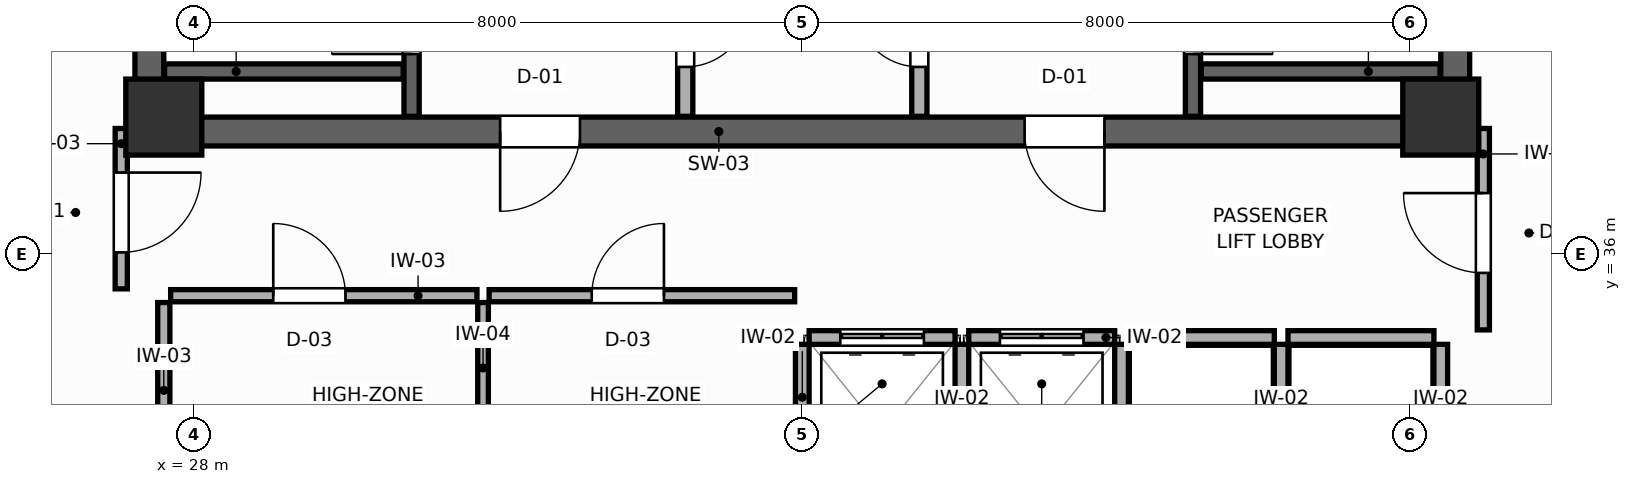
"""IFC4 building model, lengths in metres.
Left out: names, types, materials, properties, quantities, classifications, styles, units other than length and angle.
Written with IfcOpenShell. Run it as: python <this file> out.ifc"""

import sys

from ifc_helpers import new_model, si_unit, direction, frame, frame_2d, origin, origin_2d, place, context, subcontext, project, spatial, rectangle, extrude, source, transform, mapped, element, fill, save


model = new_model("IFC4")
c1 = context("Model", 3, precision=1e-05, world=origin(), true_north=direction((0.0, 1.0)))
c2 = subcontext(c1, "Body", "Model", "MODEL_VIEW")
j1 = project(units=[si_unit("LENGTHUNIT", "METRE"), si_unit("PLANEANGLEUNIT", "RADIAN")], contexts=[c1])
p1 = place(None, origin())
s1 = spatial("IfcSite", under=j1, at=p1, CompositionType="ELEMENT")
p2 = place(p1, origin())
s2 = spatial("IfcBuilding", under=s1, at=p2, CompositionType="ELEMENT")
p3 = place(p2, frame((0.0, 0.0, 216.6)))
s3 = spatial("IfcBuildingStorey", under=s2, at=p3, CompositionType="ELEMENT", Elevation=216.6)
p4 = place(p3, frame((27.22, 37.61, 0.0), z_axis=(0.0, 0.0, 1.0), x_axis=(1.0, 0.0, 0.0)))
e1 = element("IfcWall", 1, at=p4, inside=s3, PredefinedType="SHEAR", context=c2, shape_type="SweptSolid", body=[
    extrude(rectangle(XDim=17.56, YDim=0.38, at=frame_2d((8.78, 0.0))), origin(), (0.0, 0.0, 1.0), 3.6),
])
p5 = place(p4, frame((4.805, 0.0, 0.0)))
e2 = element("IfcOpeningElement", 2, at=p5, cuts=e1, PredefinedType="OPENING", context=c2, shape_type="SweptSolid", body=[
    extrude(rectangle(XDim=1.05, YDim=2.1, at=frame_2d((0.525, 1.05))), frame((0.0, 0.2, 0.0), z_axis=(0.0, -1.0, 0.0), x_axis=(1.0, 0.0, 0.0)), (0.0, 0.0, 1.0), 0.4),
])
p6 = place(p4, frame((11.705, 0.0, 0.0)))
e3 = element("IfcOpeningElement", 3, at=p6, cuts=e1, PredefinedType="OPENING", context=c2, shape_type="SweptSolid", body=[
    extrude(rectangle(XDim=1.05, YDim=2.1, at=frame_2d((0.525, 1.05))), frame((0.0, 0.2, 0.0), z_axis=(0.0, -1.0, 0.0), x_axis=(1.0, 0.0, 0.0)), (0.0, 0.0, 1.0), 0.4),
])
for number, where, z_axis, x_axis in (
    (4, (27.41, 37.8, 0.0), (0.0, 0.0, 1.0), (0.0, 1.0, 0.0)),
    (5, (44.59, 37.8, 0.0), (0.0, 0.0, 1.0), (0.0, 1.0, 0.0)),
):
    element("IfcWall", number, at=place(p3, frame(where, z_axis=z_axis, x_axis=x_axis)), inside=s3, PredefinedType="SHEAR", context=c2, shape_type="SweptSolid", body=[
        extrude(rectangle(XDim=9.0, YDim=0.38, at=frame_2d((4.5, 0.0))), origin(), (0.0, 0.0, 1.0), 3.6),
    ])
m1 = source(origin(), c2, "Body", "SweptSolid", [
    extrude(rectangle(XDim=1.0, YDim=1.0, at=origin_2d()), origin(), (0.0, 0.0, 1.0), 3.6),
])
for number, where, z_axis, x_axis in (
    (6, (27.6, 37.8, 0.0), (0.0, 0.0, 1.0), (1.0, 0.0, 0.0)),
    (7, (44.4, 37.8, 0.0), (0.0, 0.0, 1.0), (1.0, 0.0, 0.0)),
):
    element("IfcColumn", number, at=place(p3, frame(where, z_axis=z_axis, x_axis=x_axis)), inside=s3, PredefinedType="COLUMN", context=c2, shape_type="MappedRepresentation", body=[
        mapped(m1, transform((0.0, 0.0, 0.0), scale=1.0)),
    ])
p7 = place(p3, frame((30.86, 37.81, 0.0), z_axis=(0.0, 0.0, 1.0), x_axis=(0.0, 1.0, 0.0)))
e8 = element("IfcWall", 8, at=p7, inside=s3, PredefinedType="SHEAR", context=c2, shape_type="SweptSolid", body=[
    extrude(rectangle(XDim=8.98, YDim=0.2, at=frame_2d((4.49, 0.0))), origin(), (0.0, 0.0, 1.0), 3.6),
])
p8 = place(p7, frame((0.82, 0.0, 0.0)))
e9 = element("IfcOpeningElement", 9, at=p8, cuts=e8, PredefinedType="OPENING", context=c2, shape_type="SweptSolid", body=[
    extrude(rectangle(XDim=1.05, YDim=2.1, at=frame_2d((0.525, 1.05))), frame((0.0, 0.11, 0.0), z_axis=(0.0, -1.0, 0.0), x_axis=(1.0, 0.0, 0.0)), (0.0, 0.0, 1.0), 0.22),
])
p9 = place(p3, frame((27.61, 38.4, 0.0), z_axis=(0.0, 0.0, 1.0), x_axis=(1.0, 0.0, 0.0)))
e10 = element("IfcWall", 10, at=p9, inside=s3, PredefinedType="SHEAR", context=c2, shape_type="SweptSolid", body=[
    extrude(rectangle(XDim=3.14, YDim=0.2, at=frame_2d((1.57, 0.0))), origin(), (0.0, 0.0, 1.0), 3.6),
])
p10 = place(p3, frame((41.14, 37.81, 0.0), z_axis=(0.0, 0.0, 1.0), x_axis=(0.0, 1.0, 0.0)))
e11 = element("IfcWall", 11, at=p10, inside=s3, PredefinedType="SHEAR", context=c2, shape_type="SweptSolid", body=[
    extrude(rectangle(XDim=8.98, YDim=0.2, at=frame_2d((4.49, 0.0))), origin(), (0.0, 0.0, 1.0), 3.6),
])
p11 = place(p10, frame((0.82, 0.0, 0.0)))
e12 = element("IfcOpeningElement", 12, at=p11, cuts=e11, PredefinedType="OPENING", context=c2, shape_type="SweptSolid", body=[
    extrude(rectangle(XDim=1.05, YDim=2.1, at=frame_2d((0.525, 1.05))), frame((0.0, 0.11, 0.0), z_axis=(0.0, -1.0, 0.0), x_axis=(1.0, 0.0, 0.0)), (0.0, 0.0, 1.0), 0.22),
])
p12 = place(p3, frame((41.25, 38.4, 0.0), z_axis=(0.0, 0.0, 1.0), x_axis=(1.0, 0.0, 0.0)))
e13 = element("IfcWall", 13, at=p12, inside=s3, PredefinedType="SHEAR", context=c2, shape_type="SweptSolid", body=[
    extrude(rectangle(XDim=3.14, YDim=0.2, at=frame_2d((1.57, 0.0))), origin(), (0.0, 0.0, 1.0), 3.6),
])
p13 = place(p3, frame((34.46, 37.81, 0.0), z_axis=(0.0, 0.0, 1.0), x_axis=(0.0, 1.0, 0.0)))
e14 = element("IfcWall", 14, at=p13, inside=s3, PredefinedType="PARTITIONING", context=c2, shape_type="SweptSolid", body=[
    extrude(rectangle(XDim=8.98, YDim=0.2, at=frame_2d((4.49, 0.0))), origin(), (0.0, 0.0, 1.0), 3.41),
])
p14 = place(p13, frame((0.65, 0.0, 0.0)))
e15 = element("IfcOpeningElement", 15, at=p14, cuts=e14, PredefinedType="OPENING", context=c2, shape_type="SweptSolid", body=[
    extrude(rectangle(XDim=0.85, YDim=2.05, at=frame_2d((0.425, 1.025))), frame((0.0, 0.11, 0.0), z_axis=(0.0, -1.0, 0.0), x_axis=(1.0, 0.0, 0.0)), (0.0, 0.0, 1.0), 0.22),
])
p15 = place(p3, frame((37.54, 37.81, 0.0), z_axis=(0.0, 0.0, 1.0), x_axis=(0.0, 1.0, 0.0)))
e16 = element("IfcWall", 16, at=p15, inside=s3, PredefinedType="PARTITIONING", context=c2, shape_type="SweptSolid", body=[
    extrude(rectangle(XDim=8.98, YDim=0.2, at=frame_2d((4.49, 0.0))), origin(), (0.0, 0.0, 1.0), 3.41),
])
p16 = place(p15, frame((0.65, 0.0, 0.0)))
e17 = element("IfcOpeningElement", 17, at=p16, cuts=e16, PredefinedType="OPENING", context=c2, shape_type="SweptSolid", body=[
    extrude(rectangle(XDim=0.85, YDim=2.05, at=frame_2d((0.425, 1.025))), frame((0.0, 0.11, 0.0), z_axis=(0.0, -1.0, 0.0), x_axis=(1.0, 0.0, 0.0)), (0.0, 0.0, 1.0), 0.22),
])
p17 = place(p3, frame((36.09, 34.9, 0.0), z_axis=(0.0, 0.0, 1.0), x_axis=(1.0, 0.0, 0.0)))
e18 = element("IfcWall", 18, at=p17, inside=s3, PredefinedType="PARTITIONING", context=c2, shape_type="SweptSolid", body=[
    extrude(rectangle(XDim=1.92, YDim=0.18, at=frame_2d((0.96, 0.0))), origin(), (0.0, 0.0, 1.0), 3.41),
])
p18 = place(p17, frame((0.41, 0.0, 0.0)))
e19 = element("IfcOpeningElement", 19, at=p18, cuts=e18, PredefinedType="OPENING", context=c2, shape_type="SweptSolid", body=[
    extrude(rectangle(XDim=1.1, YDim=2.1, at=frame_2d((0.55, 1.05))), frame((0.0, 0.1, 0.0), z_axis=(0.0, -1.0, 0.0), x_axis=(1.0, 0.0, 0.0)), (0.0, 0.0, 1.0), 0.2),
])
p19 = place(p3, frame((36.0, 32.49, 0.0), z_axis=(0.0, 0.0, 1.0), x_axis=(0.0, 1.0, 0.0)))
e20 = element("IfcWall", 20, at=p19, inside=s3, PredefinedType="PARTITIONING", context=c2, shape_type="SweptSolid", body=[
    extrude(rectangle(XDim=2.32, YDim=0.18, at=frame_2d((1.16, 0.0))), origin(), (0.0, 0.0, 1.0), 3.41),
])
p20 = place(p3, frame((38.19, 34.9, 0.0), z_axis=(0.0, 0.0, 1.0), x_axis=(1.0, 0.0, 0.0)))
e21 = element("IfcWall", 21, at=p20, inside=s3, PredefinedType="PARTITIONING", context=c2, shape_type="SweptSolid", body=[
    extrude(rectangle(XDim=1.92, YDim=0.18, at=frame_2d((0.96, 0.0))), origin(), (0.0, 0.0, 1.0), 3.41),
])
p21 = place(p20, frame((0.41, 0.0, 0.0)))
e22 = element("IfcOpeningElement", 22, at=p21, cuts=e21, PredefinedType="OPENING", context=c2, shape_type="SweptSolid", body=[
    extrude(rectangle(XDim=1.1, YDim=2.1, at=frame_2d((0.55, 1.05))), frame((0.0, 0.1, 0.0), z_axis=(0.0, -1.0, 0.0), x_axis=(1.0, 0.0, 0.0)), (0.0, 0.0, 1.0), 0.2),
])
p22 = place(p3, frame((38.1, 32.49, 0.0), z_axis=(0.0, 0.0, 1.0), x_axis=(0.0, 1.0, 0.0)))
e23 = element("IfcWall", 23, at=p22, inside=s3, PredefinedType="PARTITIONING", context=c2, shape_type="SweptSolid", body=[
    extrude(rectangle(XDim=2.32, YDim=0.18, at=frame_2d((1.16, 0.0))), origin(), (0.0, 0.0, 1.0), 3.41),
])
p23 = place(p3, frame((40.29, 34.9, 0.0), z_axis=(0.0, 0.0, 1.0), x_axis=(1.0, 0.0, 0.0)))
e24 = element("IfcWall", 24, at=p23, inside=s3, PredefinedType="PARTITIONING", context=c2, shape_type="SweptSolid", body=[
    extrude(rectangle(XDim=1.92, YDim=0.18, at=frame_2d((0.96, 0.0))), origin(), (0.0, 0.0, 1.0), 3.41),
])
p24 = place(p3, frame((40.2, 32.49, 0.0), z_axis=(0.0, 0.0, 1.0), x_axis=(0.0, 1.0, 0.0)))
e25 = element("IfcWall", 25, at=p24, inside=s3, PredefinedType="PARTITIONING", context=c2, shape_type="SweptSolid", body=[
    extrude(rectangle(XDim=2.32, YDim=0.18, at=frame_2d((1.16, 0.0))), origin(), (0.0, 0.0, 1.0), 3.41),
])
p25 = place(p3, frame((42.39, 34.9, 0.0), z_axis=(0.0, 0.0, 1.0), x_axis=(1.0, 0.0, 0.0)))
e26 = element("IfcWall", 26, at=p25, inside=s3, PredefinedType="PARTITIONING", context=c2, shape_type="SweptSolid", body=[
    extrude(rectangle(XDim=1.92, YDim=0.18, at=frame_2d((0.96, 0.0))), origin(), (0.0, 0.0, 1.0), 3.41),
])
for number, where, z_axis, x_axis in (
    (27, (42.3, 32.49, 0.0), (0.0, 0.0, 1.0), (0.0, 1.0, 0.0)),
    (28, (44.4, 32.49, 0.0), (0.0, 0.0, 1.0), (0.0, 1.0, 0.0)),
):
    element("IfcWall", number, at=place(p3, frame(where, z_axis=z_axis, x_axis=x_axis)), inside=s3, PredefinedType="PARTITIONING", context=c2, shape_type="SweptSolid", body=[
        extrude(rectangle(XDim=2.32, YDim=0.18, at=frame_2d((1.16, 0.0))), origin(), (0.0, 0.0, 1.0), 3.41),
    ])
p26 = place(p3, frame((27.6, 33.05, 0.0), z_axis=(0.0, 0.0, 1.0), x_axis=(0.0, 1.0, 0.0)))
e29 = element("IfcWall", 29, at=p26, inside=s3, PredefinedType="PARTITIONING", context=c2, shape_type="SweptSolid", body=[
    extrude(rectangle(XDim=2.31, YDim=0.16, at=frame_2d((1.155, 0.0))), origin(), (0.0, 0.0, 1.0), 3.41),
])
p27 = place(p3, frame((31.8, 32.49, 0.0), z_axis=(0.0, 0.0, 1.0), x_axis=(0.0, 1.0, 0.0)))
e30 = element("IfcWall", 30, at=p27, inside=s3, PredefinedType="PARTITIONING", context=c2, shape_type="SweptSolid", body=[
    extrude(rectangle(XDim=2.87, YDim=0.14, at=frame_2d((1.435, 0.0))), origin(), (0.0, 0.0, 1.0), 3.41),
])
p28 = place(p3, frame((27.69, 35.45, 0.0), z_axis=(0.0, 0.0, 1.0), x_axis=(1.0, 0.0, 0.0)))
e31 = element("IfcWall", 31, at=p28, inside=s3, PredefinedType="PARTITIONING", context=c2, shape_type="SweptSolid", body=[
    extrude(rectangle(XDim=4.03, YDim=0.16, at=frame_2d((2.015, 0.0))), origin(), (0.0, 0.0, 1.0), 3.41),
])
p29 = place(p28, frame((1.35, 0.0, 0.0)))
e32 = element("IfcOpeningElement", 32, at=p29, cuts=e31, PredefinedType="OPENING", context=c2, shape_type="SweptSolid", body=[
    extrude(rectangle(XDim=0.95, YDim=2.05, at=frame_2d((0.475, 1.025))), frame((0.0, 0.09, 0.0), z_axis=(0.0, -1.0, 0.0), x_axis=(1.0, 0.0, 0.0)), (0.0, 0.0, 1.0), 0.18),
])
p30 = place(p3, frame((31.88, 35.45, 0.0), z_axis=(0.0, 0.0, 1.0), x_axis=(1.0, 0.0, 0.0)))
e33 = element("IfcWall", 33, at=p30, inside=s3, PredefinedType="PARTITIONING", context=c2, shape_type="SweptSolid", body=[
    extrude(rectangle(XDim=4.02, YDim=0.16, at=frame_2d((2.01, 0.0))), origin(), (0.0, 0.0, 1.0), 3.41),
])
p31 = place(p30, frame((1.35, 0.0, 0.0)))
e34 = element("IfcOpeningElement", 34, at=p31, cuts=e33, PredefinedType="OPENING", context=c2, shape_type="SweptSolid", body=[
    extrude(rectangle(XDim=0.95, YDim=2.05, at=frame_2d((0.475, 1.025))), frame((0.0, 0.09, 0.0), z_axis=(0.0, -1.0, 0.0), x_axis=(1.0, 0.0, 0.0)), (0.0, 0.0, 1.0), 0.18),
])
p32 = place(p3, frame((27.04, 35.54, 0.0), z_axis=(0.0, 0.0, 1.0), x_axis=(0.0, 1.0, 0.0)))
e35 = element("IfcWall", 35, at=p32, inside=s3, PredefinedType="PARTITIONING", context=c2, shape_type="SweptSolid", body=[
    extrude(rectangle(XDim=2.11, YDim=0.16, at=frame_2d((1.055, 0.0))), origin(), (0.0, 0.0, 1.0), 3.41),
])
p33 = place(p32, frame((0.48, 0.0, 0.0)))
e36 = element("IfcOpeningElement", 36, at=p33, cuts=e35, PredefinedType="OPENING", context=c2, shape_type="SweptSolid", body=[
    extrude(rectangle(XDim=1.05, YDim=2.1, at=frame_2d((0.525, 1.05))), frame((0.0, 0.09, 0.0), z_axis=(0.0, -1.0, 0.0), x_axis=(1.0, 0.0, 0.0)), (0.0, 0.0, 1.0), 0.18),
])
p34 = place(p3, frame((44.96, 35.0, 0.0), z_axis=(0.0, 0.0, 1.0), x_axis=(0.0, 1.0, 0.0)))
e37 = element("IfcWall", 37, at=p34, inside=s3, PredefinedType="PARTITIONING", context=c2, shape_type="SweptSolid", body=[
    extrude(rectangle(XDim=2.65, YDim=0.16, at=frame_2d((1.325, 0.0))), origin(), (0.0, 0.0, 1.0), 3.41),
])
p35 = place(p34, frame((0.75, 0.0, 0.0)))
e38 = element("IfcOpeningElement", 38, at=p35, cuts=e37, PredefinedType="OPENING", context=c2, shape_type="SweptSolid", body=[
    extrude(rectangle(XDim=1.05, YDim=2.1, at=frame_2d((0.525, 1.05))), frame((0.0, 0.09, 0.0), z_axis=(0.0, -1.0, 0.0), x_axis=(1.0, 0.0, 0.0)), (0.0, 0.0, 1.0), 0.18),
])
p36 = place(p8, origin())
e39 = element("IfcDoor", 39, at=p36, inside=s3, OperationType="SINGLE_SWING_LEFT", PredefinedType="DOOR", context=c2, shape_type="SweptSolid", body=[
    extrude(rectangle(XDim=1.05, YDim=2.1, at=frame_2d((0.525, 1.05))), frame((0.0, 0.025, 0.0), z_axis=(0.0, -1.0, 0.0), x_axis=(1.0, 0.0, 0.0)), (0.0, 0.0, 1.0), 0.05),
])
fill(e9, e39)
p37 = place(p11, frame((1.05, 0.0, 0.0), z_axis=(0.0, 0.0, 1.0), x_axis=(-1.0, 0.0, 0.0)))
e40 = element("IfcDoor", 40, at=p37, inside=s3, OperationType="SINGLE_SWING_RIGHT", PredefinedType="DOOR", context=c2, shape_type="SweptSolid", body=[
    extrude(rectangle(XDim=1.05, YDim=2.1, at=frame_2d((0.525, 1.05))), frame((0.0, 0.025, 0.0), z_axis=(0.0, -1.0, 0.0), x_axis=(1.0, 0.0, 0.0)), (0.0, 0.0, 1.0), 0.05),
])
fill(e12, e40)
p38 = place(p14, frame((0.85, 0.0, 0.0), z_axis=(0.0, 0.0, 1.0), x_axis=(-1.0, 0.0, 0.0)))
e41 = element("IfcDoor", 41, at=p38, inside=s3, OperationType="SINGLE_SWING_LEFT", PredefinedType="DOOR", context=c2, shape_type="SweptSolid", body=[
    extrude(rectangle(XDim=0.85, YDim=2.05, at=frame_2d((0.425, 1.025))), frame((0.0, 0.025, 0.0), z_axis=(0.0, -1.0, 0.0), x_axis=(1.0, 0.0, 0.0)), (0.0, 0.0, 1.0), 0.05),
])
fill(e15, e41)
p39 = place(p16, origin())
e42 = element("IfcDoor", 42, at=p39, inside=s3, OperationType="SINGLE_SWING_RIGHT", PredefinedType="DOOR", context=c2, shape_type="SweptSolid", body=[
    extrude(rectangle(XDim=0.85, YDim=2.05, at=frame_2d((0.425, 1.025))), frame((0.0, 0.025, 0.0), z_axis=(0.0, -1.0, 0.0), x_axis=(1.0, 0.0, 0.0)), (0.0, 0.0, 1.0), 0.05),
])
fill(e17, e42)
p40 = place(p18, origin())
e43 = element("IfcDoor", 43, at=p40, inside=s3, OperationType="DOUBLE_DOOR_SLIDING", PredefinedType="DOOR", context=c2, shape_type="SweptSolid", body=[
    extrude(rectangle(XDim=1.1, YDim=2.1, at=frame_2d((0.55, 1.05))), frame((0.0, 0.025, 0.0), z_axis=(0.0, -1.0, 0.0), x_axis=(1.0, 0.0, 0.0)), (0.0, 0.0, 1.0), 0.05),
])
fill(e19, e43)
p41 = place(p21, origin())
e44 = element("IfcDoor", 44, at=p41, inside=s3, OperationType="DOUBLE_DOOR_SLIDING", PredefinedType="DOOR", context=c2, shape_type="SweptSolid", body=[
    extrude(rectangle(XDim=1.1, YDim=2.1, at=frame_2d((0.55, 1.05))), frame((0.0, 0.025, 0.0), z_axis=(0.0, -1.0, 0.0), x_axis=(1.0, 0.0, 0.0)), (0.0, 0.0, 1.0), 0.05),
])
fill(e22, e44)
p42 = place(p29, origin())
e45 = element("IfcDoor", 45, at=p42, inside=s3, OperationType="SINGLE_SWING_LEFT", PredefinedType="DOOR", context=c2, shape_type="SweptSolid", body=[
    extrude(rectangle(XDim=0.95, YDim=2.05, at=frame_2d((0.475, 1.025))), frame((0.0, 0.025, 0.0), z_axis=(0.0, -1.0, 0.0), x_axis=(1.0, 0.0, 0.0)), (0.0, 0.0, 1.0), 0.05),
])
fill(e32, e45)
p43 = place(p31, origin())
e46 = element("IfcDoor", 46, at=p43, inside=s3, OperationType="SINGLE_SWING_RIGHT", PredefinedType="DOOR", context=c2, shape_type="SweptSolid", body=[
    extrude(rectangle(XDim=0.95, YDim=2.05, at=frame_2d((0.475, 1.025))), frame((0.0, 0.025, 0.0), z_axis=(0.0, -1.0, 0.0), x_axis=(1.0, 0.0, 0.0)), (0.0, 0.0, 1.0), 0.05),
])
fill(e34, e46)
p44 = place(p33, frame((1.05, 0.0, 0.0), z_axis=(0.0, 0.0, 1.0), x_axis=(-1.0, 0.0, 0.0)))
e47 = element("IfcDoor", 47, at=p44, inside=s3, OperationType="SINGLE_SWING_LEFT", PredefinedType="DOOR", context=c2, shape_type="SweptSolid", body=[
    extrude(rectangle(XDim=1.05, YDim=2.1, at=frame_2d((0.525, 1.05))), frame((0.0, 0.025, 0.0), z_axis=(0.0, -1.0, 0.0), x_axis=(1.0, 0.0, 0.0)), (0.0, 0.0, 1.0), 0.05),
])
fill(e36, e47)
p45 = place(p35, origin())
e48 = element("IfcDoor", 48, at=p45, inside=s3, OperationType="SINGLE_SWING_RIGHT", PredefinedType="DOOR", context=c2, shape_type="SweptSolid", body=[
    extrude(rectangle(XDim=1.05, YDim=2.1, at=frame_2d((0.525, 1.05))), frame((0.0, 0.025, 0.0), z_axis=(0.0, -1.0, 0.0), x_axis=(1.0, 0.0, 0.0)), (0.0, 0.0, 1.0), 0.05),
])
fill(e38, e48)
p46 = place(p5, frame((1.05, 0.0, 0.0), z_axis=(0.0, 0.0, 1.0), x_axis=(-1.0, 0.0, 0.0)))
e49 = element("IfcDoor", 49, at=p46, inside=s3, OperationType="SINGLE_SWING_RIGHT", PredefinedType="DOOR", context=c2, shape_type="SweptSolid", body=[
    extrude(rectangle(XDim=1.05, YDim=2.1, at=frame_2d((0.525, 1.05))), frame((0.0, 0.025, 0.0), z_axis=(0.0, -1.0, 0.0), x_axis=(1.0, 0.0, 0.0)), (0.0, 0.0, 1.0), 0.05),
])
fill(e2, e49)
p47 = place(p6, frame((1.05, 0.0, 0.0), z_axis=(0.0, 0.0, 1.0), x_axis=(-1.0, 0.0, 0.0)))
e50 = element("IfcDoor", 50, at=p47, inside=s3, OperationType="SINGLE_SWING_LEFT", PredefinedType="DOOR", context=c2, shape_type="SweptSolid", body=[
    extrude(rectangle(XDim=1.05, YDim=2.1, at=frame_2d((0.525, 1.05))), frame((0.0, 0.025, 0.0), z_axis=(0.0, -1.0, 0.0), x_axis=(1.0, 0.0, 0.0)), (0.0, 0.0, 1.0), 0.05),
])
fill(e3, e50)
save(model, sys.argv[1])
